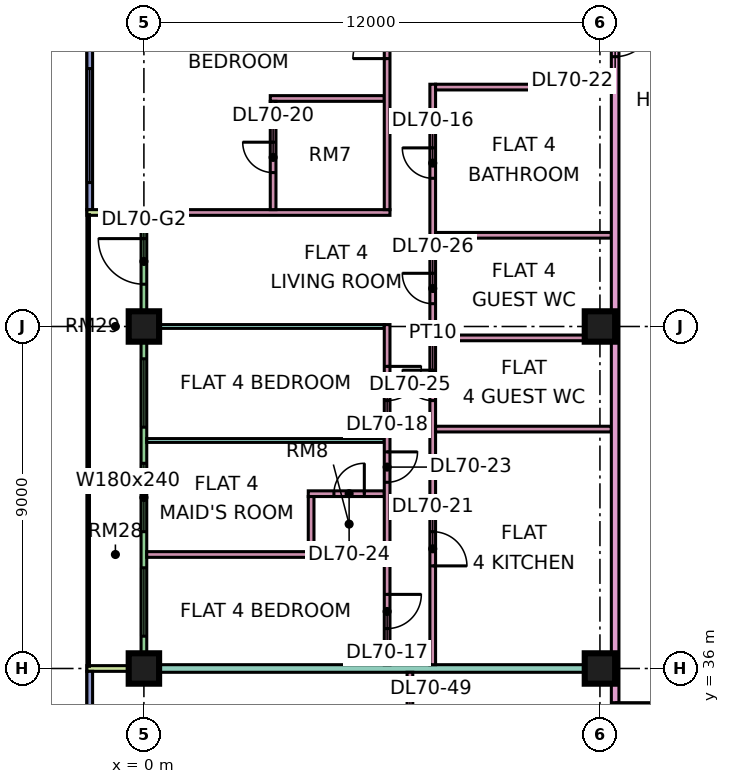
"""IFC4 building model, lengths in metres.
Left out: names, types, materials, properties, quantities, classifications, styles, units other than length and angle.
Written with IfcOpenShell. Run it as: python <this file> out.ifc"""

import sys

from ifc_helpers import new_model, si_unit, direction, frame, frame_2d, origin, origin_2d, place, context, subcontext, project, spatial, rectangle, extrude, element, fill, save


model = new_model("IFC4")
c1 = context("Model", 3, precision=1e-05, world=origin(), true_north=direction((0.0, 1.0)))
c2 = subcontext(c1, "Body", "Model", "MODEL_VIEW")
j1 = project(units=[si_unit("LENGTHUNIT", "METRE"), si_unit("PLANEANGLEUNIT", "RADIAN")], contexts=[c1])
p1 = place(None, origin())
s1 = spatial("IfcSite", under=j1, at=p1, CompositionType="ELEMENT")
p2 = place(p1, origin())
s2 = spatial("IfcBuilding", under=s1, at=p2, CompositionType="ELEMENT")
p3 = place(p2, frame((0.0, 0.0, 299.65)))
s3 = spatial("IfcBuildingStorey", under=s2, at=p3, CompositionType="ELEMENT", Elevation=299.65)
p4 = place(p3, frame((0.0, 36.0, 0.0), z_axis=(0.0, 0.0, 1.0), x_axis=(1.0, 0.0, 0.0)))
e1 = element("IfcColumn", 1, at=p4, inside=s3, PredefinedType="COLUMN", context=c2, shape_type="SweptSolid", body=[
    extrude(rectangle(XDim=0.8, YDim=0.8, at=origin_2d()), origin(), (0.0, 0.0, 1.0), 3.75),
])
for number, where, z_axis, x_axis in (
    (2, (0.0, 45.0, 0.0), (0.0, 0.0, 1.0), (1.0, 0.0, 0.0)),
    (3, (12.0, 36.0, 0.0), (0.0, 0.0, 1.0), (1.0, 0.0, 0.0)),
    (4, (12.0, 45.0, 0.0), (0.0, 0.0, 1.0), (1.0, 0.0, 0.0)),
):
    element("IfcColumn", number, at=place(p3, frame(where, z_axis=z_axis, x_axis=x_axis)), inside=s3, PredefinedType="COLUMN", context=c2, shape_type="SweptSolid", body=[
        extrude(rectangle(XDim=0.8, YDim=0.8, at=origin_2d()), origin(), (0.0, 0.0, 1.0), 3.75),
    ])
p5 = place(p3, frame((-1.425, 52.5, 0.0), z_axis=(0.0, 0.0, 1.0), x_axis=(0.0, -1.0, 0.0)))
e5 = element("IfcWall", 5, at=p5, inside=s3, PredefinedType="SOLIDWALL", context=c2, shape_type="SweptSolid", body=[
    extrude(rectangle(XDim=4.425, YDim=0.15, at=frame_2d((2.212, 0.0))), origin(), (0.0, 0.0, 1.0), 3.35),
])
p6 = place(p5, frame((0.712, 0.0, 0.45)))
e6 = element("IfcOpeningElement", 6, at=p6, cuts=e5, PredefinedType="OPENING", context=c2, shape_type="SweptSolid", body=[
    extrude(rectangle(XDim=3.0, YDim=2.4, at=frame_2d((1.5, 1.2))), frame((0.0, 0.085, 0.0), z_axis=(0.0, -1.0, 0.0), x_axis=(1.0, 0.0, 0.0)), (0.0, 0.0, 1.0), 0.17),
])
p7 = place(p3, frame((0.0, 47.925, 0.0), z_axis=(0.0, 0.0, 1.0), x_axis=(0.0, -1.0, 0.0)))
e7 = element("IfcWall", 7, at=p7, inside=s3, PredefinedType="SOLIDWALL", context=c2, shape_type="SweptSolid", body=[
    extrude(rectangle(XDim=11.85, YDim=0.15, at=frame_2d((5.925, 0.0))), origin(), (0.0, 0.0, 1.0), 3.35),
])
p8 = place(p7, frame((0.613, 0.0, 0.0)))
e8 = element("IfcOpeningElement", 8, at=p8, cuts=e7, PredefinedType="OPENING", context=c2, shape_type="SweptSolid", body=[
    extrude(rectangle(XDim=1.2, YDim=2.4, at=frame_2d((0.6, 1.2))), frame((0.0, 0.085, 0.0), z_axis=(0.0, -1.0, 0.0), x_axis=(1.0, 0.0, 0.0)), (0.0, 0.0, 1.0), 0.17),
])
p9 = place(p7, frame((3.775, 0.0, 0.45)))
e9 = element("IfcOpeningElement", 9, at=p9, cuts=e7, PredefinedType="OPENING", context=c2, shape_type="SweptSolid", body=[
    extrude(rectangle(XDim=1.8, YDim=2.4, at=frame_2d((0.9, 1.2))), frame((0.0, 0.085, 0.0), z_axis=(0.0, -1.0, 0.0), x_axis=(1.0, 0.0, 0.0)), (0.0, 0.0, 1.0), 0.17),
])
p10 = place(p7, frame((6.525, 0.0, 0.45)))
e10 = element("IfcOpeningElement", 10, at=p10, cuts=e7, PredefinedType="OPENING", context=c2, shape_type="SweptSolid", body=[
    extrude(rectangle(XDim=1.8, YDim=2.4, at=frame_2d((0.9, 1.2))), frame((0.0, 0.085, 0.0), z_axis=(0.0, -1.0, 0.0), x_axis=(1.0, 0.0, 0.0)), (0.0, 0.0, 1.0), 0.17),
])
p11 = place(p7, frame((9.275, 0.0, 0.45)))
e11 = element("IfcOpeningElement", 11, at=p11, cuts=e7, PredefinedType="OPENING", context=c2, shape_type="SweptSolid", body=[
    extrude(rectangle(XDim=1.8, YDim=2.4, at=frame_2d((0.9, 1.2))), frame((0.0, 0.085, 0.0), z_axis=(0.0, -1.0, 0.0), x_axis=(1.0, 0.0, 0.0)), (0.0, 0.0, 1.0), 0.17),
])
for number, where, z_axis, x_axis in (
    (12, (-1.5, 48.0, 0.0), (0.0, 0.0, 1.0), (1.0, 0.0, 0.0)),
    (13, (-1.5, 36.0, 0.0), (0.0, 0.0, 1.0), (1.0, 0.0, 0.0)),
):
    element("IfcWall", number, at=place(p3, frame(where, z_axis=z_axis, x_axis=x_axis)), inside=s3, PredefinedType="SOLIDWALL", context=c2, shape_type="SweptSolid", body=[
        extrude(rectangle(XDim=1.5, YDim=0.15, at=frame_2d((0.75, 0.0))), origin(), (0.0, 0.0, 1.0), 3.35),
    ])
p12 = place(p3, frame((-1.425, 35.925, 0.0), z_axis=(0.0, 0.0, 1.0), x_axis=(0.0, -1.0, 0.0)))
e14 = element("IfcWall", 14, at=p12, inside=s3, PredefinedType="SOLIDWALL", context=c2, shape_type="SweptSolid", body=[
    extrude(rectangle(XDim=11.85, YDim=0.15, at=frame_2d((5.925, 0.0))), origin(), (0.0, 0.0, 1.0), 3.35),
])
p13 = place(p12, frame((1.462, 0.0, 0.45)))
e15 = element("IfcOpeningElement", 15, at=p13, cuts=e14, PredefinedType="OPENING", context=c2, shape_type="SweptSolid", body=[
    extrude(rectangle(XDim=3.0, YDim=2.4, at=frame_2d((1.5, 1.2))), frame((0.0, 0.085, 0.0), z_axis=(0.0, -1.0, 0.0), x_axis=(1.0, 0.0, 0.0)), (0.0, 0.0, 1.0), 0.17),
])
p14 = place(p12, frame((7.387, 0.0, 0.45)))
e16 = element("IfcOpeningElement", 16, at=p14, cuts=e14, PredefinedType="OPENING", context=c2, shape_type="SweptSolid", body=[
    extrude(rectangle(XDim=3.0, YDim=2.4, at=frame_2d((1.5, 1.2))), frame((0.0, 0.085, 0.0), z_axis=(0.0, -1.0, 0.0), x_axis=(1.0, 0.0, 0.0)), (0.0, 0.0, 1.0), 0.17),
])
e17 = element("IfcWall", 17, at=p4, inside=s3, PredefinedType="PARTITIONING", context=c2, shape_type="SweptSolid", body=[
    extrude(rectangle(XDim=12.3, YDim=0.2, at=frame_2d((6.15, 0.0))), origin(), (0.0, 0.0, 1.0), 3.35),
])
p15 = place(p3, frame((0.0, 48.0, 0.0), z_axis=(0.0, 0.0, 1.0), x_axis=(1.0, 0.0, 0.0)))
e18 = element("IfcWall", 18, at=p15, inside=s3, PredefinedType="PARTITIONING", context=c2, shape_type="SweptSolid", body=[
    extrude(rectangle(XDim=6.475, YDim=0.15, at=frame_2d((3.238, 0.0))), origin(), (0.0, 0.0, 1.0), 3.35),
])
p16 = place(p3, frame((0.074, 39.0, 0.0), z_axis=(0.0, 0.0, 1.0), x_axis=(1.0, 0.0, 0.0)))
e19 = element("IfcWall", 19, at=p16, inside=s3, PredefinedType="PARTITIONING", context=c2, shape_type="SweptSolid", body=[
    extrude(rectangle(XDim=6.251, YDim=0.15, at=frame_2d((3.125, 0.0))), origin(), (0.0, 0.0, 1.0), 3.35),
])
for number, where, z_axis, x_axis in (
    (20, (0.074, 42.0, 0.0), (0.0, 0.0, 1.0), (1.0, 0.0, 0.0)),
    (21, (0.074, 45.0, 0.0), (0.0, 0.0, 1.0), (1.0, 0.0, 0.0)),
):
    element("IfcWall", number, at=place(p3, frame(where, z_axis=z_axis, x_axis=x_axis)), inside=s3, PredefinedType="PARTITIONING", context=c2, shape_type="SweptSolid", body=[
        extrude(rectangle(XDim=6.251, YDim=0.1, at=frame_2d((3.125, 0.0))), origin(), (0.0, 0.0, 1.0), 3.35),
    ])
p17 = place(p3, frame((3.325, 51.0, 0.0), z_axis=(0.0, 0.0, 1.0), x_axis=(1.0, 0.0, 0.0)))
e22 = element("IfcWall", 22, at=p17, inside=s3, PredefinedType="PARTITIONING", context=c2, shape_type="SweptSolid", body=[
    extrude(rectangle(XDim=3.0, YDim=0.15, at=frame_2d((1.5, 0.0))), origin(), (0.0, 0.0, 1.0), 3.35),
])
p18 = place(p3, frame((3.4, 48.075, 0.0), z_axis=(0.0, 0.0, 1.0), x_axis=(0.0, 1.0, 0.0)))
e23 = element("IfcWall", 23, at=p18, inside=s3, PredefinedType="PARTITIONING", context=c2, shape_type="SweptSolid", body=[
    extrude(rectangle(XDim=2.85, YDim=0.15, at=frame_2d((1.425, 0.0))), origin(), (0.0, 0.0, 1.0), 3.35),
])
p19 = place(p18, frame((0.975, 0.0, 0.0)))
e24 = element("IfcOpeningElement", 24, at=p19, cuts=e23, PredefinedType="OPENING", context=c2, shape_type="SweptSolid", body=[
    extrude(rectangle(XDim=0.8, YDim=2.1, at=frame_2d((0.4, 1.05))), frame((0.0, 0.085, 0.0), z_axis=(0.0, -1.0, 0.0), x_axis=(1.0, 0.0, 0.0)), (0.0, 0.0, 1.0), 0.17),
])
p20 = place(p3, frame((4.325, 40.6, 0.0), z_axis=(0.0, 0.0, 1.0), x_axis=(1.0, 0.0, 0.0)))
e25 = element("IfcWall", 25, at=p20, inside=s3, PredefinedType="PARTITIONING", context=c2, shape_type="SweptSolid", body=[
    extrude(rectangle(XDim=2.0, YDim=0.15, at=frame_2d((1.0, 0.0))), origin(), (0.0, 0.0, 1.0), 3.35),
])
p21 = place(p20, frame((0.675, 0.0, 0.0)))
e26 = element("IfcOpeningElement", 26, at=p21, cuts=e25, PredefinedType="OPENING", context=c2, shape_type="SweptSolid", body=[
    extrude(rectangle(XDim=0.8, YDim=2.1, at=frame_2d((0.4, 1.05))), frame((0.0, 0.085, 0.0), z_axis=(0.0, -1.0, 0.0), x_axis=(1.0, 0.0, 0.0)), (0.0, 0.0, 1.0), 0.17),
])
p22 = place(p3, frame((4.4, 39.075, 0.0), z_axis=(0.0, 0.0, 1.0), x_axis=(0.0, 1.0, 0.0)))
e27 = element("IfcWall", 27, at=p22, inside=s3, PredefinedType="PARTITIONING", context=c2, shape_type="SweptSolid", body=[
    extrude(rectangle(XDim=1.45, YDim=0.15, at=frame_2d((0.725, 0.0))), origin(), (0.0, 0.0, 1.0), 3.35),
])
p23 = place(p3, frame((6.4, 36.1, 0.0), z_axis=(0.0, 0.0, 1.0), x_axis=(0.0, 1.0, 0.0)))
e28 = element("IfcWall", 28, at=p23, inside=s3, PredefinedType="PARTITIONING", context=c2, shape_type="SweptSolid", body=[
    extrude(rectangle(XDim=8.95, YDim=0.15, at=frame_2d((4.475, 0.0))), origin(), (0.0, 0.0, 1.0), 3.35),
])
p24 = place(p23, frame((0.95, 0.0, 0.0)))
e29 = element("IfcOpeningElement", 29, at=p24, cuts=e28, PredefinedType="OPENING", context=c2, shape_type="SweptSolid", body=[
    extrude(rectangle(XDim=0.9, YDim=2.1, at=frame_2d((0.45, 1.05))), frame((0.0, 0.085, 0.0), z_axis=(0.0, -1.0, 0.0), x_axis=(1.0, 0.0, 0.0)), (0.0, 0.0, 1.0), 0.17),
])
p25 = place(p23, frame((6.95, 0.0, 0.0)))
e30 = element("IfcOpeningElement", 30, at=p25, cuts=e28, PredefinedType="OPENING", context=c2, shape_type="SweptSolid", body=[
    extrude(rectangle(XDim=0.9, YDim=2.1, at=frame_2d((0.45, 1.05))), frame((0.0, 0.085, 0.0), z_axis=(0.0, -1.0, 0.0), x_axis=(1.0, 0.0, 0.0)), (0.0, 0.0, 1.0), 0.17),
])
p26 = place(p23, frame((4.8, 0.0, 0.0)))
e31 = element("IfcOpeningElement", 31, at=p26, cuts=e28, PredefinedType="OPENING", context=c2, shape_type="SweptSolid", body=[
    extrude(rectangle(XDim=0.8, YDim=2.1, at=frame_2d((0.4, 1.05))), frame((0.0, 0.085, 0.0), z_axis=(0.0, -1.0, 0.0), x_axis=(1.0, 0.0, 0.0)), (0.0, 0.0, 1.0), 0.17),
])
p27 = place(p3, frame((6.4, 48.075, 0.0), z_axis=(0.0, 0.0, 1.0), x_axis=(0.0, 1.0, 0.0)))
e32 = element("IfcWall", 32, at=p27, inside=s3, PredefinedType="PARTITIONING", context=c2, shape_type="SweptSolid", body=[
    extrude(rectangle(XDim=7.275, YDim=0.15, at=frame_2d((3.638, 0.0))), origin(), (0.0, 0.0, 1.0), 3.35),
])
p28 = place(p27, frame((3.975, 0.0, 0.0)))
e33 = element("IfcOpeningElement", 33, at=p28, cuts=e32, PredefinedType="OPENING", context=c2, shape_type="SweptSolid", body=[
    extrude(rectangle(XDim=0.9, YDim=2.1, at=frame_2d((0.45, 1.05))), frame((0.0, 0.085, 0.0), z_axis=(0.0, -1.0, 0.0), x_axis=(1.0, 0.0, 0.0)), (0.0, 0.0, 1.0), 0.17),
])
p29 = place(p3, frame((7.0, 30.075, 0.0), z_axis=(0.0, 0.0, 1.0), x_axis=(0.0, 1.0, 0.0)))
e34 = element("IfcWall", 34, at=p29, inside=s3, PredefinedType="PARTITIONING", context=c2, shape_type="SweptSolid", body=[
    extrude(rectangle(XDim=5.825, YDim=0.15, at=frame_2d((2.913, 0.0))), origin(), (0.0, 0.0, 1.0), 3.35),
])
p30 = place(p29, frame((3.975, 0.0, 0.0)))
e35 = element("IfcOpeningElement", 35, at=p30, cuts=e34, PredefinedType="OPENING", context=c2, shape_type="SweptSolid", body=[
    extrude(rectangle(XDim=0.9, YDim=2.1, at=frame_2d((0.45, 1.05))), frame((0.0, 0.085, 0.0), z_axis=(0.0, -1.0, 0.0), x_axis=(1.0, 0.0, 0.0)), (0.0, 0.0, 1.0), 0.17),
])
p31 = place(p3, frame((7.6, 36.1, 0.0), z_axis=(0.0, 0.0, 1.0), x_axis=(0.0, 1.0, 0.0)))
e36 = element("IfcWall", 36, at=p31, inside=s3, PredefinedType="PARTITIONING", context=c2, shape_type="SweptSolid", body=[
    extrude(rectangle(XDim=15.275, YDim=0.15, at=frame_2d((7.637, 0.0))), origin(), (0.0, 0.0, 1.0), 3.35),
])
p32 = place(p31, frame((12.8, 0.0, 0.0)))
e37 = element("IfcOpeningElement", 37, at=p32, cuts=e36, PredefinedType="OPENING", context=c2, shape_type="SweptSolid", body=[
    extrude(rectangle(XDim=0.8, YDim=2.1, at=frame_2d((0.4, 1.05))), frame((0.0, 0.085, 0.0), z_axis=(0.0, -1.0, 0.0), x_axis=(1.0, 0.0, 0.0)), (0.0, 0.0, 1.0), 0.17),
])
p33 = place(p31, frame((2.6, 0.0, 0.0)))
e38 = element("IfcOpeningElement", 38, at=p33, cuts=e36, PredefinedType="OPENING", context=c2, shape_type="SweptSolid", body=[
    extrude(rectangle(XDim=0.9, YDim=2.1, at=frame_2d((0.45, 1.05))), frame((0.0, 0.085, 0.0), z_axis=(0.0, -1.0, 0.0), x_axis=(1.0, 0.0, 0.0)), (0.0, 0.0, 1.0), 0.17),
])
p34 = place(p31, frame((6.95, 0.0, 0.0)))
e39 = element("IfcOpeningElement", 39, at=p34, cuts=e36, PredefinedType="OPENING", context=c2, shape_type="SweptSolid", body=[
    extrude(rectangle(XDim=0.8, YDim=2.1, at=frame_2d((0.4, 1.05))), frame((0.0, 0.085, 0.0), z_axis=(0.0, -1.0, 0.0), x_axis=(1.0, 0.0, 0.0)), (0.0, 0.0, 1.0), 0.17),
])
p35 = place(p31, frame((9.5, 0.0, 0.0)))
e40 = element("IfcOpeningElement", 40, at=p35, cuts=e36, PredefinedType="OPENING", context=c2, shape_type="SweptSolid", body=[
    extrude(rectangle(XDim=0.8, YDim=2.1, at=frame_2d((0.4, 1.05))), frame((0.0, 0.085, 0.0), z_axis=(0.0, -1.0, 0.0), x_axis=(1.0, 0.0, 0.0)), (0.0, 0.0, 1.0), 0.17),
])
for number, where, z_axis, x_axis in (
    (41, (7.675, 42.3, 0.0), (0.0, 0.0, 1.0), (1.0, 0.0, 0.0)),
    (42, (7.675, 44.7, 0.0), (0.0, 0.0, 1.0), (1.0, 0.0, 0.0)),
    (43, (7.675, 47.4, 0.0), (0.0, 0.0, 1.0), (1.0, 0.0, 0.0)),
    (44, (7.675, 51.3, 0.0), (0.0, 0.0, 1.0), (1.0, 0.0, 0.0)),
):
    element("IfcWall", number, at=place(p3, frame(where, z_axis=z_axis, x_axis=x_axis)), inside=s3, PredefinedType="PARTITIONING", context=c2, shape_type="SweptSolid", body=[
        extrude(rectangle(XDim=4.625, YDim=0.15, at=frame_2d((2.312, 0.0))), origin(), (0.0, 0.0, 1.0), 3.35),
    ])
p36 = place(p3, frame((12.4, 20.0, 0.0), z_axis=(0.0, 0.0, 1.0), x_axis=(0.0, 1.0, 0.0)))
e45 = element("IfcWall", 45, at=p36, inside=s3, PredefinedType="PARTITIONING", context=c2, shape_type="SweptSolid", body=[
    extrude(rectangle(XDim=33.926, YDim=0.2, at=frame_2d((16.963, 0.0))), origin(), (0.0, 0.0, 1.0), 3.35),
])
p37 = place(p36, frame((32.1, 0.0, 0.0)))
e46 = element("IfcOpeningElement", 46, at=p37, cuts=e45, PredefinedType="OPENING", context=c2, shape_type="SweptSolid", body=[
    extrude(rectangle(XDim=1.0, YDim=2.1, at=frame_2d((0.5, 1.05))), frame((0.0, 0.11, 0.0), z_axis=(0.0, -1.0, 0.0), x_axis=(1.0, 0.0, 0.0)), (0.0, 0.0, 1.0), 0.22),
])
p38 = place(p36, frame((0.6, 0.0, 0.0)))
e47 = element("IfcOpeningElement", 47, at=p38, cuts=e45, PredefinedType="OPENING", context=c2, shape_type="SweptSolid", body=[
    extrude(rectangle(XDim=1.2, YDim=2.1, at=frame_2d((0.6, 1.05))), frame((0.0, 0.11, 0.0), z_axis=(0.0, -1.0, 0.0), x_axis=(1.0, 0.0, 0.0)), (0.0, 0.0, 1.0), 0.22),
])
p39 = place(p36, frame((14.1, 0.0, 0.0)))
e48 = element("IfcOpeningElement", 48, at=p39, cuts=e45, PredefinedType="OPENING", context=c2, shape_type="SweptSolid", body=[
    extrude(rectangle(XDim=1.0, YDim=2.1, at=frame_2d((0.5, 1.05))), frame((0.0, 0.11, 0.0), z_axis=(0.0, -1.0, 0.0), x_axis=(1.0, 0.0, 0.0)), (0.0, 0.0, 1.0), 0.22),
])
p40 = place(p6, origin())
e49 = element("IfcWindow", 49, at=p40, inside=s3, PartitioningType="SINGLE_PANEL", PredefinedType="WINDOW", context=c2, shape_type="SweptSolid", body=[
    extrude(rectangle(XDim=3.0, YDim=2.4, at=frame_2d((1.5, 1.2))), frame((0.0, 0.03, 0.0), z_axis=(0.0, -1.0, 0.0), x_axis=(1.0, 0.0, 0.0)), (0.0, 0.0, 1.0), 0.06),
])
fill(e6, e49)
p41 = place(p8, frame((1.2, 0.0, 0.0), z_axis=(0.0, 0.0, 1.0), x_axis=(-1.0, 0.0, 0.0)))
e50 = element("IfcDoor", 50, at=p41, inside=s3, OperationType="DOUBLE_DOOR_SINGLE_SWING", PredefinedType="DOOR", context=c2, shape_type="SweptSolid", body=[
    extrude(rectangle(XDim=1.2, YDim=2.4, at=frame_2d((0.6, 1.2))), frame((0.0, 0.025, 0.0), z_axis=(0.0, -1.0, 0.0), x_axis=(1.0, 0.0, 0.0)), (0.0, 0.0, 1.0), 0.05),
])
fill(e8, e50)
p42 = place(p9, origin())
e51 = element("IfcWindow", 51, at=p42, inside=s3, PartitioningType="SINGLE_PANEL", PredefinedType="WINDOW", context=c2, shape_type="SweptSolid", body=[
    extrude(rectangle(XDim=1.8, YDim=2.4, at=frame_2d((0.9, 1.2))), frame((0.0, 0.03, 0.0), z_axis=(0.0, -1.0, 0.0), x_axis=(1.0, 0.0, 0.0)), (0.0, 0.0, 1.0), 0.06),
])
fill(e9, e51)
p43 = place(p10, origin())
e52 = element("IfcWindow", 52, at=p43, inside=s3, PartitioningType="SINGLE_PANEL", PredefinedType="WINDOW", context=c2, shape_type="SweptSolid", body=[
    extrude(rectangle(XDim=1.8, YDim=2.4, at=frame_2d((0.9, 1.2))), frame((0.0, 0.03, 0.0), z_axis=(0.0, -1.0, 0.0), x_axis=(1.0, 0.0, 0.0)), (0.0, 0.0, 1.0), 0.06),
])
fill(e10, e52)
p44 = place(p11, origin())
e53 = element("IfcWindow", 53, at=p44, inside=s3, PartitioningType="SINGLE_PANEL", PredefinedType="WINDOW", context=c2, shape_type="SweptSolid", body=[
    extrude(rectangle(XDim=1.8, YDim=2.4, at=frame_2d((0.9, 1.2))), frame((0.0, 0.03, 0.0), z_axis=(0.0, -1.0, 0.0), x_axis=(1.0, 0.0, 0.0)), (0.0, 0.0, 1.0), 0.06),
])
fill(e11, e53)
p45 = place(p32, frame((0.8, 0.0, 0.0), z_axis=(0.0, 0.0, 1.0), x_axis=(-1.0, 0.0, 0.0)))
e54 = element("IfcDoor", 54, at=p45, inside=s3, OperationType="SINGLE_SWING_RIGHT", PredefinedType="DOOR", context=c2, shape_type="SweptSolid", body=[
    extrude(rectangle(XDim=0.8, YDim=2.1, at=frame_2d((0.4, 1.05))), frame((0.0, 0.025, 0.0), z_axis=(0.0, -1.0, 0.0), x_axis=(1.0, 0.0, 0.0)), (0.0, 0.0, 1.0), 0.05),
])
fill(e37, e54)
p46 = place(p24, origin())
e55 = element("IfcDoor", 55, at=p46, inside=s3, OperationType="SINGLE_SWING_RIGHT", PredefinedType="DOOR", context=c2, shape_type="SweptSolid", body=[
    extrude(rectangle(XDim=0.9, YDim=2.1, at=frame_2d((0.45, 1.05))), frame((0.0, 0.025, 0.0), z_axis=(0.0, -1.0, 0.0), x_axis=(1.0, 0.0, 0.0)), (0.0, 0.0, 1.0), 0.05),
])
fill(e29, e55)
p47 = place(p25, origin())
e56 = element("IfcDoor", 56, at=p47, inside=s3, OperationType="SINGLE_SWING_RIGHT", PredefinedType="DOOR", context=c2, shape_type="SweptSolid", body=[
    extrude(rectangle(XDim=0.9, YDim=2.1, at=frame_2d((0.45, 1.05))), frame((0.0, 0.025, 0.0), z_axis=(0.0, -1.0, 0.0), x_axis=(1.0, 0.0, 0.0)), (0.0, 0.0, 1.0), 0.05),
])
fill(e30, e56)
p48 = place(p28, origin())
e57 = element("IfcDoor", 57, at=p48, inside=s3, OperationType="SINGLE_SWING_LEFT", PredefinedType="DOOR", context=c2, shape_type="SweptSolid", body=[
    extrude(rectangle(XDim=0.9, YDim=2.1, at=frame_2d((0.45, 1.05))), frame((0.0, 0.025, 0.0), z_axis=(0.0, -1.0, 0.0), x_axis=(1.0, 0.0, 0.0)), (0.0, 0.0, 1.0), 0.05),
])
fill(e33, e57)
p49 = place(p19, frame((0.8, 0.0, 0.0), z_axis=(0.0, 0.0, 1.0), x_axis=(-1.0, 0.0, 0.0)))
e58 = element("IfcDoor", 58, at=p49, inside=s3, OperationType="SINGLE_SWING_RIGHT", PredefinedType="DOOR", context=c2, shape_type="SweptSolid", body=[
    extrude(rectangle(XDim=0.8, YDim=2.1, at=frame_2d((0.4, 1.05))), frame((0.0, 0.025, 0.0), z_axis=(0.0, -1.0, 0.0), x_axis=(1.0, 0.0, 0.0)), (0.0, 0.0, 1.0), 0.05),
])
fill(e24, e58)
p50 = place(p33, frame((0.9, 0.0, 0.0), z_axis=(0.0, 0.0, 1.0), x_axis=(-1.0, 0.0, 0.0)))
e59 = element("IfcDoor", 59, at=p50, inside=s3, OperationType="SINGLE_SWING_LEFT", PredefinedType="DOOR", context=c2, shape_type="SweptSolid", body=[
    extrude(rectangle(XDim=0.9, YDim=2.1, at=frame_2d((0.45, 1.05))), frame((0.0, 0.025, 0.0), z_axis=(0.0, -1.0, 0.0), x_axis=(1.0, 0.0, 0.0)), (0.0, 0.0, 1.0), 0.05),
])
fill(e38, e59)
p51 = place(p37, origin())
e60 = element("IfcDoor", 60, at=p51, inside=s3, OperationType="SINGLE_SWING_RIGHT", PredefinedType="DOOR", context=c2, shape_type="SweptSolid", body=[
    extrude(rectangle(XDim=1.0, YDim=2.1, at=frame_2d((0.5, 1.05))), frame((0.0, 0.025, 0.0), z_axis=(0.0, -1.0, 0.0), x_axis=(1.0, 0.0, 0.0)), (0.0, 0.0, 1.0), 0.05),
])
fill(e46, e60)
p52 = place(p26, origin())
e61 = element("IfcDoor", 61, at=p52, inside=s3, OperationType="SINGLE_SWING_RIGHT", PredefinedType="DOOR", context=c2, shape_type="SweptSolid", body=[
    extrude(rectangle(XDim=0.8, YDim=2.1, at=frame_2d((0.4, 1.05))), frame((0.0, 0.025, 0.0), z_axis=(0.0, -1.0, 0.0), x_axis=(1.0, 0.0, 0.0)), (0.0, 0.0, 1.0), 0.05),
])
fill(e31, e61)
p53 = place(p21, frame((0.8, 0.0, 0.0), z_axis=(0.0, 0.0, 1.0), x_axis=(-1.0, 0.0, 0.0)))
e62 = element("IfcDoor", 62, at=p53, inside=s3, OperationType="SINGLE_SWING_RIGHT", PredefinedType="DOOR", context=c2, shape_type="SweptSolid", body=[
    extrude(rectangle(XDim=0.8, YDim=2.1, at=frame_2d((0.4, 1.05))), frame((0.0, 0.025, 0.0), z_axis=(0.0, -1.0, 0.0), x_axis=(1.0, 0.0, 0.0)), (0.0, 0.0, 1.0), 0.05),
])
fill(e26, e62)
p54 = place(p34, frame((0.8, 0.0, 0.0), z_axis=(0.0, 0.0, 1.0), x_axis=(-1.0, 0.0, 0.0)))
e63 = element("IfcDoor", 63, at=p54, inside=s3, OperationType="SINGLE_SWING_RIGHT", PredefinedType="DOOR", context=c2, shape_type="SweptSolid", body=[
    extrude(rectangle(XDim=0.8, YDim=2.1, at=frame_2d((0.4, 1.05))), frame((0.0, 0.025, 0.0), z_axis=(0.0, -1.0, 0.0), x_axis=(1.0, 0.0, 0.0)), (0.0, 0.0, 1.0), 0.05),
])
fill(e39, e63)
p55 = place(p35, frame((0.8, 0.0, 0.0), z_axis=(0.0, 0.0, 1.0), x_axis=(-1.0, 0.0, 0.0)))
e64 = element("IfcDoor", 64, at=p55, inside=s3, OperationType="SINGLE_SWING_RIGHT", PredefinedType="DOOR", context=c2, shape_type="SweptSolid", body=[
    extrude(rectangle(XDim=0.8, YDim=2.1, at=frame_2d((0.4, 1.05))), frame((0.0, 0.025, 0.0), z_axis=(0.0, -1.0, 0.0), x_axis=(1.0, 0.0, 0.0)), (0.0, 0.0, 1.0), 0.05),
])
fill(e40, e64)
p56 = place(p39, origin())
e65 = element("IfcDoor", 65, at=p56, inside=s3, OperationType="SINGLE_SWING_RIGHT", PredefinedType="DOOR", context=c2, shape_type="SweptSolid", body=[
    extrude(rectangle(XDim=1.0, YDim=2.1, at=frame_2d((0.5, 1.05))), frame((0.0, 0.025, 0.0), z_axis=(0.0, -1.0, 0.0), x_axis=(1.0, 0.0, 0.0)), (0.0, 0.0, 1.0), 0.05),
])
fill(e48, e65)
save(model, sys.argv[1])
